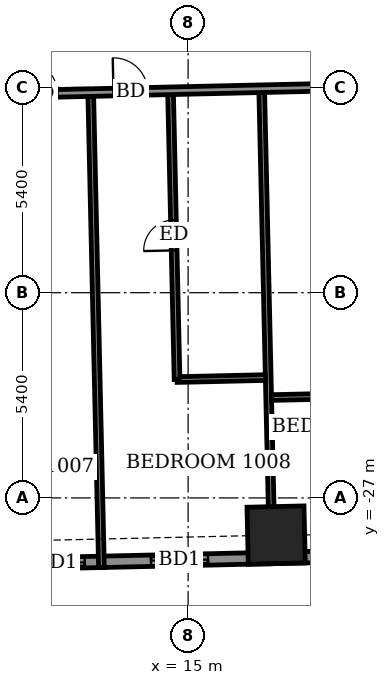
"""IFC4 building model, lengths in metres.
Left out: names, types, materials, properties, quantities, classifications, styles, units other than length and angle.
Written with IfcOpenShell. Run it as: python <this file> out.ifc"""

import sys

from ifc_helpers import new_model, si_unit, direction, frame, frame_2d, origin, origin_2d, place, context, subcontext, project, spatial, rectangle, extrude, element, fill, save


model = new_model("IFC4")
c1 = context("Model", 3, precision=1e-05, world=origin(), true_north=direction((0.0, 1.0)))
c2 = subcontext(c1, "Body", "Model", "MODEL_VIEW")
j1 = project(units=[si_unit("LENGTHUNIT", "METRE"), si_unit("PLANEANGLEUNIT", "RADIAN")], contexts=[c1])
p1 = place(None, origin())
s1 = spatial("IfcSite", under=j1, at=p1, CompositionType="ELEMENT")
p2 = place(p1, origin())
s2 = spatial("IfcBuilding", under=s1, at=p2, CompositionType="ELEMENT")
p3 = place(p2, frame((0.0, 0.0, 44.9)))
s3 = spatial("IfcBuildingStorey", under=s2, at=p3, CompositionType="ELEMENT", Elevation=44.9)
p4 = place(p3, frame((17.316, -27.977, -0.55), z_axis=(0.0, 0.0, 1.0), x_axis=(0.999743591179, 0.022644025629, 0.0)))
e1 = element("IfcColumn", 1, at=p4, inside=s3, PredefinedType="COLUMN", context=c2, shape_type="SweptSolid", body=[
    extrude(rectangle(XDim=1.5, YDim=1.5, at=origin_2d()), origin(), (0.0, 0.0, 1.0), 3.6),
])
p5 = place(p3, frame((-27.423, -29.593, 0.0), z_axis=(0.0, 0.0, 1.0), x_axis=(0.999742563204, 0.022689365739, 0.0)))
e2 = element("IfcWall", 2, at=p5, inside=s3, PredefinedType="SOLIDWALL", context=c2, shape_type="SweptSolid", body=[
    extrude(rectangle(XDim=52.101, YDim=0.3, at=frame_2d((26.05, 0.0))), origin(), (0.0, 0.0, 1.0), 3.05),
])
p6 = place(p5, frame((3.162, 0.0, 0.0)))
e3 = element("IfcOpeningElement", 3, at=p6, cuts=e2, PredefinedType="OPENING", context=c2, shape_type="SweptSolid", body=[
    extrude(rectangle(XDim=1.5, YDim=2.4, at=frame_2d((0.75, 1.2))), frame((0.0, 0.16, 0.0), z_axis=(0.0, -1.0, 0.0), x_axis=(1.0, 0.0, 0.0)), (0.0, 0.0, 1.0), 0.32),
])
p7 = place(p5, frame((9.168, 0.0, 0.0)))
e4 = element("IfcOpeningElement", 4, at=p7, cuts=e2, PredefinedType="OPENING", context=c2, shape_type="SweptSolid", body=[
    extrude(rectangle(XDim=1.5, YDim=2.4, at=frame_2d((0.75, 1.2))), frame((0.0, 0.16, 0.0), z_axis=(0.0, -1.0, 0.0), x_axis=(1.0, 0.0, 0.0)), (0.0, 0.0, 1.0), 0.32),
])
p8 = place(p5, frame((12.411, 0.0, 0.0)))
e5 = element("IfcOpeningElement", 5, at=p8, cuts=e2, PredefinedType="OPENING", context=c2, shape_type="SweptSolid", body=[
    extrude(rectangle(XDim=1.5, YDim=2.4, at=frame_2d((0.75, 1.2))), frame((0.0, 0.16, 0.0), z_axis=(0.0, -1.0, 0.0), x_axis=(1.0, 0.0, 0.0)), (0.0, 0.0, 1.0), 0.32),
])
p9 = place(p5, frame((18.275, 0.0, 0.0)))
e6 = element("IfcOpeningElement", 6, at=p9, cuts=e2, PredefinedType="OPENING", context=c2, shape_type="SweptSolid", body=[
    extrude(rectangle(XDim=1.5, YDim=2.4, at=frame_2d((0.75, 1.2))), frame((0.0, 0.16, 0.0), z_axis=(0.0, -1.0, 0.0), x_axis=(1.0, 0.0, 0.0)), (0.0, 0.0, 1.0), 0.32),
])
p10 = place(p5, frame((23.603, 0.0, 0.0)))
e7 = element("IfcOpeningElement", 7, at=p10, cuts=e2, PredefinedType="OPENING", context=c2, shape_type="SweptSolid", body=[
    extrude(rectangle(XDim=1.5, YDim=2.4, at=frame_2d((0.75, 1.2))), frame((0.0, 0.16, 0.0), z_axis=(0.0, -1.0, 0.0), x_axis=(1.0, 0.0, 0.0)), (0.0, 0.0, 1.0), 0.32),
])
p11 = place(p5, frame((26.846, 0.0, 0.0)))
e8 = element("IfcOpeningElement", 8, at=p11, cuts=e2, PredefinedType="OPENING", context=c2, shape_type="SweptSolid", body=[
    extrude(rectangle(XDim=1.5, YDim=2.4, at=frame_2d((0.75, 1.2))), frame((0.0, 0.16, 0.0), z_axis=(0.0, -1.0, 0.0), x_axis=(1.0, 0.0, 0.0)), (0.0, 0.0, 1.0), 0.32),
])
p12 = place(p5, frame((31.975, 0.0, 0.0)))
e9 = element("IfcOpeningElement", 9, at=p12, cuts=e2, PredefinedType="OPENING", context=c2, shape_type="SweptSolid", body=[
    extrude(rectangle(XDim=1.5, YDim=2.4, at=frame_2d((0.75, 1.2))), frame((0.0, 0.16, 0.0), z_axis=(0.0, -1.0, 0.0), x_axis=(1.0, 0.0, 0.0)), (0.0, 0.0, 1.0), 0.32),
])
p13 = place(p5, frame((38.214, 0.0, 0.0)))
e10 = element("IfcOpeningElement", 10, at=p13, cuts=e2, PredefinedType="OPENING", context=c2, shape_type="SweptSolid", body=[
    extrude(rectangle(XDim=1.5, YDim=2.4, at=frame_2d((0.75, 1.2))), frame((0.0, 0.16, 0.0), z_axis=(0.0, -1.0, 0.0), x_axis=(1.0, 0.0, 0.0)), (0.0, 0.0, 1.0), 0.32),
])
p14 = place(p5, frame((41.457, 0.0, 0.0)))
e11 = element("IfcOpeningElement", 11, at=p14, cuts=e2, PredefinedType="OPENING", context=c2, shape_type="SweptSolid", body=[
    extrude(rectangle(XDim=1.5, YDim=2.4, at=frame_2d((0.75, 1.2))), frame((0.0, 0.16, 0.0), z_axis=(0.0, -1.0, 0.0), x_axis=(1.0, 0.0, 0.0)), (0.0, 0.0, 1.0), 0.32),
])
p15 = place(p5, frame((46.507, 0.0, 0.0)))
e12 = element("IfcOpeningElement", 12, at=p15, cuts=e2, PredefinedType="OPENING", context=c2, shape_type="SweptSolid", body=[
    extrude(rectangle(XDim=1.5, YDim=2.4, at=frame_2d((0.75, 1.2))), frame((0.0, 0.16, 0.0), z_axis=(0.0, -1.0, 0.0), x_axis=(1.0, 0.0, 0.0)), (0.0, 0.0, 1.0), 0.32),
])
p16 = place(p5, frame((49.671, 0.0, 0.9)))
e13 = element("IfcOpeningElement", 13, at=p16, cuts=e2, PredefinedType="OPENING", context=c2, shape_type="SweptSolid", body=[
    extrude(rectangle(XDim=0.9, YDim=1.5, at=frame_2d((0.45, 0.75))), frame((0.0, 0.16, 0.0), z_axis=(0.0, -1.0, 0.0), x_axis=(1.0, 0.0, 0.0)), (0.0, 0.0, 1.0), 0.32),
])
p17 = place(p3, frame((14.049, -30.102, 0.0), z_axis=(0.0, 0.0, 1.0), x_axis=(0.999743178102, 0.022662255828, 0.0)))
e14 = element("IfcWall", 14, at=p17, inside=s3, PredefinedType="USERDEFINED", context=c2, shape_type="SweptSolid", body=[
    extrude(rectangle(XDim=6.0, YDim=0.55, at=frame_2d((3.0, 0.0))), origin(), (0.0, 0.0, 1.0), 0.8),
])
p18 = place(p3, frame((12.72, -28.832, 0.0), z_axis=(0.0, 0.0, 1.0), x_axis=(-0.022661475803, 0.999743195783, 0.0)))
e15 = element("IfcWall", 15, at=p18, inside=s3, PredefinedType="PARTITIONING", context=c2, shape_type="SweptSolid", body=[
    extrude(rectangle(XDim=12.4, YDim=0.15, at=frame_2d((6.2, 0.0))), origin(), (0.0, 0.0, 1.0), 2.55),
])
p19 = place(p3, frame((17.219, -28.73, 0.0), z_axis=(0.0, 0.0, 1.0), x_axis=(-0.022661475803, 0.999743195783, 0.0)))
e16 = element("IfcWall", 16, at=p19, inside=s3, PredefinedType="PARTITIONING", context=c2, shape_type="SweptSolid", body=[
    extrude(rectangle(XDim=12.4, YDim=0.15, at=frame_2d((6.2, 0.0))), origin(), (0.0, 0.0, 1.0), 3.05),
])
for number, where, z_axis, x_axis in (
    (17, (17.195, -24.359, 0.0), (0.0, 0.0, 1.0), (1.0, 0.022, 0.0)),
    (18, (14.709, -23.886, 0.0), (0.0, 0.0, 1.0), (1.0, 0.023, 0.0)),
):
    element("IfcWall", number, at=place(p3, frame(where, z_axis=z_axis, x_axis=x_axis)), inside=s3, PredefinedType="PARTITIONING", context=c2, shape_type="SweptSolid", body=[
        extrude(rectangle(XDim=2.324, YDim=0.15, at=frame_2d((1.162, 0.0))), origin(), (0.0, 0.0, 1.0), 3.05),
    ])
p20 = place(p3, frame((14.709, -23.886, 0.0), z_axis=(0.0, 0.0, 1.0), x_axis=(-0.022656334507, 0.999743312309, 0.0)))
e19 = element("IfcWall", 19, at=p20, inside=s3, PredefinedType="PARTITIONING", context=c2, shape_type="SweptSolid", body=[
    extrude(rectangle(XDim=7.5, YDim=0.15, at=frame_2d((3.75, 0.0))), origin(), (0.0, 0.0, 1.0), 3.05),
])
p21 = place(p20, frame((3.4, 0.0, 0.0)))
e20 = element("IfcOpeningElement", 20, at=p21, cuts=e19, PredefinedType="OPENING", context=c2, shape_type="SweptSolid", body=[
    extrude(rectangle(XDim=0.8, YDim=2.1, at=frame_2d((0.4, 1.05))), frame((0.0, 0.085, 0.0), z_axis=(0.0, -1.0, 0.0), x_axis=(1.0, 0.0, 0.0)), (0.0, 0.0, 1.0), 0.17),
])
p22 = place(p3, frame((-30.652, -17.313, 0.0), z_axis=(0.0, 0.0, 1.0), x_axis=(0.999742623764, 0.02268669719, 0.0)))
e21 = element("IfcWall", 21, at=p22, inside=s3, PredefinedType="PARTITIONING", context=c2, shape_type="SweptSolid", body=[
    extrude(rectangle(XDim=58.8, YDim=0.2, at=frame_2d((29.4, 0.0))), origin(), (0.0, 0.0, 1.0), 3.05),
])
p23 = place(p22, frame((2.6, 0.0, 0.0)))
e22 = element("IfcOpeningElement", 22, at=p23, cuts=e21, PredefinedType="OPENING", context=c2, shape_type="SweptSolid", body=[
    extrude(rectangle(XDim=1.0, YDim=2.1, at=frame_2d((0.5, 1.05))), frame((0.0, 0.11, 0.0), z_axis=(0.0, -1.0, 0.0), x_axis=(1.0, 0.0, 0.0)), (0.0, 0.0, 1.0), 0.22),
])
p24 = place(p22, frame((8.45, 0.0, 0.0)))
e23 = element("IfcOpeningElement", 23, at=p24, cuts=e21, PredefinedType="OPENING", context=c2, shape_type="SweptSolid", body=[
    extrude(rectangle(XDim=0.9, YDim=2.1, at=frame_2d((0.45, 1.05))), frame((0.0, 0.11, 0.0), z_axis=(0.0, -1.0, 0.0), x_axis=(1.0, 0.0, 0.0)), (0.0, 0.0, 1.0), 0.22),
])
p25 = place(p22, frame((13.325, 0.0, 0.0)))
e24 = element("IfcOpeningElement", 24, at=p25, cuts=e21, PredefinedType="OPENING", context=c2, shape_type="SweptSolid", body=[
    extrude(rectangle(XDim=0.9, YDim=2.1, at=frame_2d((0.45, 1.05))), frame((0.0, 0.11, 0.0), z_axis=(0.0, -1.0, 0.0), x_axis=(1.0, 0.0, 0.0)), (0.0, 0.0, 1.0), 0.22),
])
p26 = place(p22, frame((15.7, 0.0, 0.0)))
e25 = element("IfcOpeningElement", 25, at=p26, cuts=e21, PredefinedType="OPENING", context=c2, shape_type="SweptSolid", body=[
    extrude(rectangle(XDim=0.9, YDim=2.1, at=frame_2d((0.45, 1.05))), frame((0.0, 0.11, 0.0), z_axis=(0.0, -1.0, 0.0), x_axis=(1.0, 0.0, 0.0)), (0.0, 0.0, 1.0), 0.22),
])
p27 = place(p22, frame((22.725, 0.0, 0.0)))
e26 = element("IfcOpeningElement", 26, at=p27, cuts=e21, PredefinedType="OPENING", context=c2, shape_type="SweptSolid", body=[
    extrude(rectangle(XDim=0.9, YDim=2.1, at=frame_2d((0.45, 1.05))), frame((0.0, 0.11, 0.0), z_axis=(0.0, -1.0, 0.0), x_axis=(1.0, 0.0, 0.0)), (0.0, 0.0, 1.0), 0.22),
])
p28 = place(p22, frame((24.875, 0.0, 0.0)))
e27 = element("IfcOpeningElement", 27, at=p28, cuts=e21, PredefinedType="OPENING", context=c2, shape_type="SweptSolid", body=[
    extrude(rectangle(XDim=0.9, YDim=2.1, at=frame_2d((0.45, 1.05))), frame((0.0, 0.11, 0.0), z_axis=(0.0, -1.0, 0.0), x_axis=(1.0, 0.0, 0.0)), (0.0, 0.0, 1.0), 0.22),
])
p29 = place(p22, frame((31.825, 0.0, 0.0)))
e28 = element("IfcOpeningElement", 28, at=p29, cuts=e21, PredefinedType="OPENING", context=c2, shape_type="SweptSolid", body=[
    extrude(rectangle(XDim=0.9, YDim=2.1, at=frame_2d((0.45, 1.05))), frame((0.0, 0.11, 0.0), z_axis=(0.0, -1.0, 0.0), x_axis=(1.0, 0.0, 0.0)), (0.0, 0.0, 1.0), 0.22),
])
p30 = place(p22, frame((34.025, 0.0, 0.0)))
e29 = element("IfcOpeningElement", 29, at=p30, cuts=e21, PredefinedType="OPENING", context=c2, shape_type="SweptSolid", body=[
    extrude(rectangle(XDim=0.9, YDim=2.1, at=frame_2d((0.45, 1.05))), frame((0.0, 0.11, 0.0), z_axis=(0.0, -1.0, 0.0), x_axis=(1.0, 0.0, 0.0)), (0.0, 0.0, 1.0), 0.22),
])
p31 = place(p22, frame((41.325, 0.0, 0.0)))
e30 = element("IfcOpeningElement", 30, at=p31, cuts=e21, PredefinedType="OPENING", context=c2, shape_type="SweptSolid", body=[
    extrude(rectangle(XDim=0.9, YDim=2.1, at=frame_2d((0.45, 1.05))), frame((0.0, 0.11, 0.0), z_axis=(0.0, -1.0, 0.0), x_axis=(1.0, 0.0, 0.0)), (0.0, 0.0, 1.0), 0.22),
])
p32 = place(p22, frame((43.7, 0.0, 0.0)))
e31 = element("IfcOpeningElement", 31, at=p32, cuts=e21, PredefinedType="OPENING", context=c2, shape_type="SweptSolid", body=[
    extrude(rectangle(XDim=0.9, YDim=2.1, at=frame_2d((0.45, 1.05))), frame((0.0, 0.11, 0.0), z_axis=(0.0, -1.0, 0.0), x_axis=(1.0, 0.0, 0.0)), (0.0, 0.0, 1.0), 0.22),
])
p33 = place(p22, frame((50.65, 0.0, 0.0)))
e32 = element("IfcOpeningElement", 32, at=p33, cuts=e21, PredefinedType="OPENING", context=c2, shape_type="SweptSolid", body=[
    extrude(rectangle(XDim=0.9, YDim=2.1, at=frame_2d((0.45, 1.05))), frame((0.0, 0.11, 0.0), z_axis=(0.0, -1.0, 0.0), x_axis=(1.0, 0.0, 0.0)), (0.0, 0.0, 1.0), 0.22),
])
p34 = place(p22, frame((55.304, 0.0, 0.0)))
e33 = element("IfcOpeningElement", 33, at=p34, cuts=e21, PredefinedType="OPENING", context=c2, shape_type="SweptSolid", body=[
    extrude(rectangle(XDim=1.0, YDim=2.1, at=frame_2d((0.5, 1.05))), frame((0.0, 0.11, 0.0), z_axis=(0.0, -1.0, 0.0), x_axis=(1.0, 0.0, 0.0)), (0.0, 0.0, 1.0), 0.22),
])
p35 = place(p13, origin())
e34 = element("IfcDoor", 34, at=p35, inside=s3, OperationType="SLIDING_TO_LEFT", PredefinedType="DOOR", context=c2, shape_type="SweptSolid", body=[
    extrude(rectangle(XDim=1.5, YDim=2.4, at=frame_2d((0.75, 1.2))), frame((0.0, 0.025, 0.0), z_axis=(0.0, -1.0, 0.0), x_axis=(1.0, 0.0, 0.0)), (0.0, 0.0, 1.0), 0.05),
])
fill(e10, e34)
p36 = place(p14, origin())
e35 = element("IfcDoor", 35, at=p36, inside=s3, OperationType="SLIDING_TO_LEFT", PredefinedType="DOOR", context=c2, shape_type="SweptSolid", body=[
    extrude(rectangle(XDim=1.5, YDim=2.4, at=frame_2d((0.75, 1.2))), frame((0.0, 0.025, 0.0), z_axis=(0.0, -1.0, 0.0), x_axis=(1.0, 0.0, 0.0)), (0.0, 0.0, 1.0), 0.05),
])
fill(e11, e35)
p37 = place(p31, origin())
e36 = element("IfcDoor", 36, at=p37, inside=s3, OperationType="SINGLE_SWING_LEFT", PredefinedType="DOOR", context=c2, shape_type="SweptSolid", body=[
    extrude(rectangle(XDim=0.9, YDim=2.1, at=frame_2d((0.45, 1.05))), frame((0.0, 0.025, 0.0), z_axis=(0.0, -1.0, 0.0), x_axis=(1.0, 0.0, 0.0)), (0.0, 0.0, 1.0), 0.05),
])
fill(e30, e36)
p38 = place(p32, origin())
e37 = element("IfcDoor", 37, at=p38, inside=s3, OperationType="SINGLE_SWING_RIGHT", PredefinedType="DOOR", context=c2, shape_type="SweptSolid", body=[
    extrude(rectangle(XDim=0.9, YDim=2.1, at=frame_2d((0.45, 1.05))), frame((0.0, 0.025, 0.0), z_axis=(0.0, -1.0, 0.0), x_axis=(1.0, 0.0, 0.0)), (0.0, 0.0, 1.0), 0.05),
])
fill(e31, e37)
p39 = place(p21, origin())
e38 = element("IfcDoor", 38, at=p39, inside=s3, OperationType="SINGLE_SWING_RIGHT", PredefinedType="DOOR", context=c2, shape_type="SweptSolid", body=[
    extrude(rectangle(XDim=0.8, YDim=2.1, at=frame_2d((0.4, 1.05))), frame((0.0, 0.025, 0.0), z_axis=(0.0, -1.0, 0.0), x_axis=(1.0, 0.0, 0.0)), (0.0, 0.0, 1.0), 0.05),
])
fill(e20, e38)
save(model, sys.argv[1])
